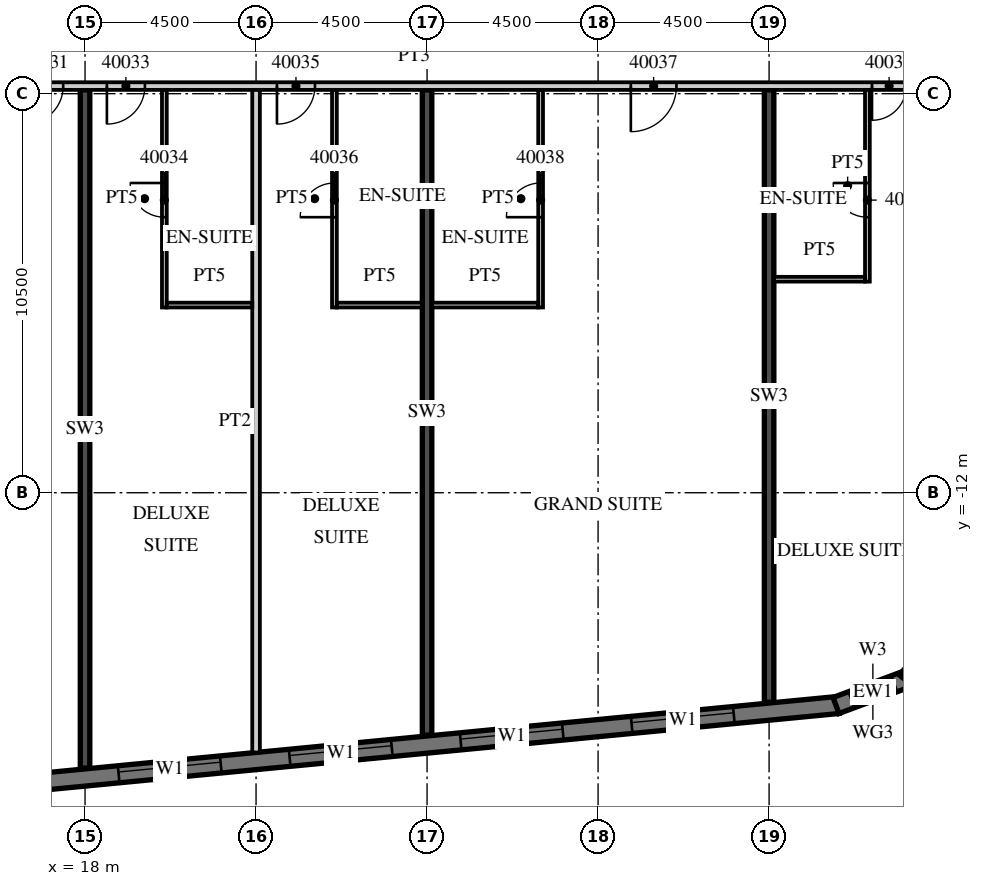
"""IFC4 building model, lengths in metres.
Left out: names, types, materials, properties, quantities, classifications, styles, units other than length and angle.
Written with IfcOpenShell. Run it as: python <this file> out.ifc"""

import sys

from ifc_helpers import new_model, si_unit, direction, frame, frame_2d, origin, place, context, subcontext, project, spatial, polyline, rectangle, outline, extrude, element, fill, save


model = new_model("IFC4")
c1 = context("Model", 3, precision=1e-05, world=origin(), true_north=direction((0.0, 1.0)))
c2 = subcontext(c1, "Body", "Model", "MODEL_VIEW")
j1 = project(units=[si_unit("LENGTHUNIT", "METRE"), si_unit("PLANEANGLEUNIT", "RADIAN")], contexts=[c1])
p1 = place(None, origin())
s1 = spatial("IfcSite", under=j1, at=p1, CompositionType="ELEMENT")
p2 = place(p1, origin())
s2 = spatial("IfcBuilding", under=s1, at=p2, CompositionType="ELEMENT")
p3 = place(p2, frame((0.0, 0.0, 173.5)))
s3 = spatial("IfcBuildingStorey", under=s2, at=p3, CompositionType="ELEMENT", Elevation=173.5)
p4 = place(p3, frame((18.0, -19.245, 0.0), z_axis=(0.0, 0.0, 1.0), x_axis=(0.0, 1.0, 0.0)))
e1 = element("IfcWall", 1, at=p4, inside=s3, PredefinedType="SHEAR", context=c2, shape_type="SweptSolid", body=[
    extrude(rectangle(XDim=17.845, YDim=0.25, at=frame_2d((8.923, 0.0))), origin(), (0.0, 0.0, 1.0), 3.3),
])
p5 = place(p3, frame((27.0, -18.379, 0.0), z_axis=(0.0, 0.0, 1.0), x_axis=(0.0, 1.0, 0.0)))
e2 = element("IfcWall", 2, at=p5, inside=s3, PredefinedType="SHEAR", context=c2, shape_type="SweptSolid", body=[
    extrude(rectangle(XDim=16.979, YDim=0.25, at=frame_2d((8.489, 0.0))), origin(), (0.0, 0.0, 1.0), 3.3),
])
p6 = place(p3, frame((36.0, -17.512, 0.0), z_axis=(0.0, 0.0, 1.0), x_axis=(0.0, 1.0, 0.0)))
e3 = element("IfcWall", 3, at=p6, inside=s3, PredefinedType="SHEAR", context=c2, shape_type="SweptSolid", body=[
    extrude(rectangle(XDim=16.112, YDim=0.25, at=frame_2d((8.056, 0.0))), origin(), (0.0, 0.0, 1.0), 3.3),
])
p7 = place(p3, frame((-13.521, -22.529, 0.0), z_axis=(0.0, 0.0, 1.0), x_axis=(0.995396436651, 0.095843277819, 0.0)))
e4 = element("IfcWall", 4, at=p7, inside=s3, PredefinedType="SOLIDWALL", context=c2, shape_type="SweptSolid", body=[
    extrude(rectangle(XDim=51.578, YDim=0.45, at=frame_2d((25.789, 0.0))), origin(), (0.0, 0.0, 1.0), 3.02),
])
p8 = place(p7, frame((0.91, 0.0, 0.45)))
e5 = element("IfcOpeningElement", 5, at=p8, cuts=e4, PredefinedType="OPENING", context=c2, shape_type="SweptSolid", body=[
    extrude(rectangle(XDim=2.7, YDim=2.25, at=frame_2d((1.35, 1.125))), frame((0.0, 0.235, 0.0), z_axis=(0.0, -1.0, 0.0), x_axis=(1.0, 0.0, 0.0)), (0.0, 0.0, 1.0), 0.47),
])
p9 = place(p7, frame((5.431, 0.0, 0.45)))
e6 = element("IfcOpeningElement", 6, at=p9, cuts=e4, PredefinedType="OPENING", context=c2, shape_type="SweptSolid", body=[
    extrude(rectangle(XDim=2.7, YDim=2.25, at=frame_2d((1.35, 1.125))), frame((0.0, 0.235, 0.0), z_axis=(0.0, -1.0, 0.0), x_axis=(1.0, 0.0, 0.0)), (0.0, 0.0, 1.0), 0.47),
])
p10 = place(p7, frame((9.952, 0.0, 0.45)))
e7 = element("IfcOpeningElement", 7, at=p10, cuts=e4, PredefinedType="OPENING", context=c2, shape_type="SweptSolid", body=[
    extrude(rectangle(XDim=2.7, YDim=2.25, at=frame_2d((1.35, 1.125))), frame((0.0, 0.235, 0.0), z_axis=(0.0, -1.0, 0.0), x_axis=(1.0, 0.0, 0.0)), (0.0, 0.0, 1.0), 0.47),
])
p11 = place(p7, frame((14.473, 0.0, 0.45)))
e8 = element("IfcOpeningElement", 8, at=p11, cuts=e4, PredefinedType="OPENING", context=c2, shape_type="SweptSolid", body=[
    extrude(rectangle(XDim=2.7, YDim=2.25, at=frame_2d((1.35, 1.125))), frame((0.0, 0.235, 0.0), z_axis=(0.0, -1.0, 0.0), x_axis=(1.0, 0.0, 0.0)), (0.0, 0.0, 1.0), 0.47),
])
p12 = place(p7, frame((18.994, 0.0, 0.45)))
e9 = element("IfcOpeningElement", 9, at=p12, cuts=e4, PredefinedType="OPENING", context=c2, shape_type="SweptSolid", body=[
    extrude(rectangle(XDim=2.7, YDim=2.25, at=frame_2d((1.35, 1.125))), frame((0.0, 0.235, 0.0), z_axis=(0.0, -1.0, 0.0), x_axis=(1.0, 0.0, 0.0)), (0.0, 0.0, 1.0), 0.47),
])
p13 = place(p7, frame((23.514, 0.0, 0.45)))
e10 = element("IfcOpeningElement", 10, at=p13, cuts=e4, PredefinedType="OPENING", context=c2, shape_type="SweptSolid", body=[
    extrude(rectangle(XDim=2.7, YDim=2.25, at=frame_2d((1.35, 1.125))), frame((0.0, 0.235, 0.0), z_axis=(0.0, -1.0, 0.0), x_axis=(1.0, 0.0, 0.0)), (0.0, 0.0, 1.0), 0.47),
])
p14 = place(p7, frame((28.035, 0.0, 0.45)))
e11 = element("IfcOpeningElement", 11, at=p14, cuts=e4, PredefinedType="OPENING", context=c2, shape_type="SweptSolid", body=[
    extrude(rectangle(XDim=2.7, YDim=2.25, at=frame_2d((1.35, 1.125))), frame((0.0, 0.235, 0.0), z_axis=(0.0, -1.0, 0.0), x_axis=(1.0, 0.0, 0.0)), (0.0, 0.0, 1.0), 0.47),
])
p15 = place(p7, frame((32.556, 0.0, 0.45)))
e12 = element("IfcOpeningElement", 12, at=p15, cuts=e4, PredefinedType="OPENING", context=c2, shape_type="SweptSolid", body=[
    extrude(rectangle(XDim=2.7, YDim=2.25, at=frame_2d((1.35, 1.125))), frame((0.0, 0.235, 0.0), z_axis=(0.0, -1.0, 0.0), x_axis=(1.0, 0.0, 0.0)), (0.0, 0.0, 1.0), 0.47),
])
p16 = place(p7, frame((37.077, 0.0, 0.45)))
e13 = element("IfcOpeningElement", 13, at=p16, cuts=e4, PredefinedType="OPENING", context=c2, shape_type="SweptSolid", body=[
    extrude(rectangle(XDim=2.7, YDim=2.25, at=frame_2d((1.35, 1.125))), frame((0.0, 0.235, 0.0), z_axis=(0.0, -1.0, 0.0), x_axis=(1.0, 0.0, 0.0)), (0.0, 0.0, 1.0), 0.47),
])
p17 = place(p7, frame((41.598, 0.0, 0.45)))
e14 = element("IfcOpeningElement", 14, at=p17, cuts=e4, PredefinedType="OPENING", context=c2, shape_type="SweptSolid", body=[
    extrude(rectangle(XDim=2.7, YDim=2.25, at=frame_2d((1.35, 1.125))), frame((0.0, 0.235, 0.0), z_axis=(0.0, -1.0, 0.0), x_axis=(1.0, 0.0, 0.0)), (0.0, 0.0, 1.0), 0.47),
])
p18 = place(p7, frame((46.119, 0.0, 0.45)))
e15 = element("IfcOpeningElement", 15, at=p18, cuts=e4, PredefinedType="OPENING", context=c2, shape_type="SweptSolid", body=[
    extrude(rectangle(XDim=2.7, YDim=2.25, at=frame_2d((1.35, 1.125))), frame((0.0, 0.235, 0.0), z_axis=(0.0, -1.0, 0.0), x_axis=(1.0, 0.0, 0.0)), (0.0, 0.0, 1.0), 0.47),
])
p19 = place(p3, frame((37.761, -17.598, 0.0), z_axis=(0.0, 0.0, 1.0), x_axis=(0.936677599948, 0.350192909346, 0.0)))
e16 = element("IfcWall", 16, at=p19, inside=s3, PredefinedType="SOLIDWALL", context=c2, shape_type="SweptSolid", body=[
    extrude(outline(polyline([(0.0, -0.225), (2.071, -0.225), (1.95, 0.225), (0.121, 0.225), (0.0, -0.225)])), origin(), (0.0, 0.0, 1.0), 3.02),
])
p20 = place(p19, frame((0.435, 0.0, 0.45)))
e17 = element("IfcOpeningElement", 17, at=p20, cuts=e16, PredefinedType="OPENING", context=c2, shape_type="SweptSolid", body=[
    extrude(rectangle(XDim=1.2, YDim=2.25, at=frame_2d((0.6, 1.125))), frame((0.0, 0.235, 0.0), z_axis=(0.0, -1.0, 0.0), x_axis=(1.0, 0.0, 0.0)), (0.0, 0.0, 1.0), 0.47),
])
p21 = place(p3, frame((39.606, -16.941, 0.0), z_axis=(0.0, 0.0, 1.0), x_axis=(0.636116318187, 0.771593176315, 0.0)))
e18 = element("IfcWall", 18, at=p21, inside=s3, PredefinedType="SOLIDWALL", context=c2, shape_type="SweptSolid", body=[
    extrude(outline(polyline([(0.0, -0.225), (2.071, -0.225), (1.95, 0.225), (0.121, 0.225), (0.0, -0.225)])), origin(), (0.0, 0.0, 1.0), 3.02),
])
p22 = place(p21, frame((0.435, 0.0, 0.45)))
e19 = element("IfcOpeningElement", 19, at=p22, cuts=e18, PredefinedType="OPENING", context=c2, shape_type="SweptSolid", body=[
    extrude(rectangle(XDim=1.2, YDim=2.25, at=frame_2d((0.6, 1.125))), frame((0.0, 0.235, 0.0), z_axis=(0.0, -1.0, 0.0), x_axis=(1.0, 0.0, 0.0)), (0.0, 0.0, 1.0), 0.47),
])
p23 = place(p3, frame((41.214, -13.466, 0.0), z_axis=(0.0, 0.0, 1.0), x_axis=(-0.095847314626, 0.995396047952, 0.0)))
e20 = element("IfcWall", 20, at=p23, inside=s3, PredefinedType="SOLIDWALL", context=c2, shape_type="SweptSolid", body=[
    extrude(rectangle(XDim=34.0, YDim=0.45, at=frame_2d((17.0, 0.0))), origin(), (0.0, 0.0, 1.0), 3.02),
])
p24 = place(p23, frame((3.869, 0.0, 0.45)))
e21 = element("IfcOpeningElement", 21, at=p24, cuts=e20, PredefinedType="OPENING", context=c2, shape_type="SweptSolid", body=[
    extrude(rectangle(XDim=3.3, YDim=2.25, at=frame_2d((1.65, 1.125))), frame((0.0, 0.235, 0.0), z_axis=(0.0, -1.0, 0.0), x_axis=(1.0, 0.0, 0.0)), (0.0, 0.0, 1.0), 0.47),
])
p25 = place(p23, frame((8.39, 0.0, 0.45)))
e22 = element("IfcOpeningElement", 22, at=p25, cuts=e20, PredefinedType="OPENING", context=c2, shape_type="SweptSolid", body=[
    extrude(rectangle(XDim=3.3, YDim=2.25, at=frame_2d((1.65, 1.125))), frame((0.0, 0.235, 0.0), z_axis=(0.0, -1.0, 0.0), x_axis=(1.0, 0.0, 0.0)), (0.0, 0.0, 1.0), 0.47),
])
p26 = place(p3, frame((13.5, -1.3, 0.0), z_axis=(0.0, 0.0, 1.0), x_axis=(1.0, 0.0, 0.0)))
e23 = element("IfcWall", 23, at=p26, inside=s3, PredefinedType="PARTITIONING", context=c2, shape_type="SweptSolid", body=[
    extrude(rectangle(XDim=26.317, YDim=0.2, at=frame_2d((13.158, 0.0))), origin(), (0.0, 0.0, 1.0), 3.02),
])
p27 = place(p26, frame((2.925, 0.0, 0.0)))
e24 = element("IfcOpeningElement", 24, at=p27, cuts=e23, PredefinedType="OPENING", context=c2, shape_type="SweptSolid", body=[
    extrude(rectangle(XDim=1.0, YDim=2.1, at=frame_2d((0.5, 1.05))), frame((0.0, 0.11, 0.0), z_axis=(0.0, -1.0, 0.0), x_axis=(1.0, 0.0, 0.0)), (0.0, 0.0, 1.0), 0.22),
])
p28 = place(p26, frame((5.075, 0.0, 0.0)))
e25 = element("IfcOpeningElement", 25, at=p28, cuts=e23, PredefinedType="OPENING", context=c2, shape_type="SweptSolid", body=[
    extrude(rectangle(XDim=1.0, YDim=2.1, at=frame_2d((0.5, 1.05))), frame((0.0, 0.11, 0.0), z_axis=(0.0, -1.0, 0.0), x_axis=(1.0, 0.0, 0.0)), (0.0, 0.0, 1.0), 0.22),
])
p29 = place(p26, frame((9.55, 0.0, 0.0)))
e26 = element("IfcOpeningElement", 26, at=p29, cuts=e23, PredefinedType="OPENING", context=c2, shape_type="SweptSolid", body=[
    extrude(rectangle(XDim=1.0, YDim=2.1, at=frame_2d((0.5, 1.05))), frame((0.0, 0.11, 0.0), z_axis=(0.0, -1.0, 0.0), x_axis=(1.0, 0.0, 0.0)), (0.0, 0.0, 1.0), 0.22),
])
p30 = place(p26, frame((18.862, 0.0, 0.0)))
e27 = element("IfcOpeningElement", 27, at=p30, cuts=e23, PredefinedType="OPENING", context=c2, shape_type="SweptSolid", body=[
    extrude(rectangle(XDim=1.2, YDim=2.1, at=frame_2d((0.6, 1.05))), frame((0.0, 0.11, 0.0), z_axis=(0.0, -1.0, 0.0), x_axis=(1.0, 0.0, 0.0)), (0.0, 0.0, 1.0), 0.22),
])
p31 = place(p26, frame((25.208, 0.0, 0.0)))
e28 = element("IfcOpeningElement", 28, at=p31, cuts=e23, PredefinedType="OPENING", context=c2, shape_type="SweptSolid", body=[
    extrude(rectangle(XDim=0.9, YDim=2.1, at=frame_2d((0.45, 1.05))), frame((0.0, 0.11, 0.0), z_axis=(0.0, -1.0, 0.0), x_axis=(1.0, 0.0, 0.0)), (0.0, 0.0, 1.0), 0.22),
])
p32 = place(p3, frame((22.5, -18.834, 0.0), z_axis=(0.0, 0.0, 1.0), x_axis=(0.0, 1.0, 0.0)))
e29 = element("IfcWall", 29, at=p32, inside=s3, PredefinedType="PARTITIONING", context=c2, shape_type="SweptSolid", body=[
    extrude(rectangle(XDim=17.434, YDim=0.2, at=frame_2d((8.717, 0.0))), origin(), (0.0, 0.0, 1.0), 3.02),
])
p33 = place(p3, frame((20.087, -7.125, 0.0), z_axis=(0.0, 0.0, 1.0), x_axis=(0.0, 1.0, 0.0)))
e30 = element("IfcWall", 30, at=p33, inside=s3, PredefinedType="PARTITIONING", context=c2, shape_type="SweptSolid", body=[
    extrude(rectangle(XDim=5.725, YDim=0.125, at=frame_2d((2.863, 0.0))), origin(), (0.0, 0.0, 1.0), 3.02),
])
p34 = place(p33, frame((2.375, 0.0, 0.0)))
e31 = element("IfcOpeningElement", 31, at=p34, cuts=e30, PredefinedType="OPENING", context=c2, shape_type="SweptSolid", body=[
    extrude(rectangle(XDim=0.9, YDim=2.1, at=frame_2d((0.45, 1.05))), frame((0.0, 0.073, 0.0), z_axis=(0.0, -1.0, 0.0), x_axis=(1.0, 0.0, 0.0)), (0.0, 0.0, 1.0), 0.145),
])
p35 = place(p3, frame((20.15, -7.062, 0.0), z_axis=(0.0, 0.0, 1.0), x_axis=(1.0, 0.0, 0.0)))
e32 = element("IfcWall", 32, at=p35, inside=s3, PredefinedType="PARTITIONING", context=c2, shape_type="SweptSolid", body=[
    extrude(rectangle(XDim=2.25, YDim=0.125, at=frame_2d((1.125, 0.0))), origin(), (0.0, 0.0, 1.0), 3.02),
])
p36 = place(p3, frame((24.562, -7.125, 0.0), z_axis=(0.0, 0.0, 1.0), x_axis=(0.0, 1.0, 0.0)))
e33 = element("IfcWall", 33, at=p36, inside=s3, PredefinedType="PARTITIONING", context=c2, shape_type="SweptSolid", body=[
    extrude(rectangle(XDim=5.725, YDim=0.125, at=frame_2d((2.863, 0.0))), origin(), (0.0, 0.0, 1.0), 3.02),
])
p37 = place(p36, frame((2.375, 0.0, 0.0)))
e34 = element("IfcOpeningElement", 34, at=p37, cuts=e33, PredefinedType="OPENING", context=c2, shape_type="SweptSolid", body=[
    extrude(rectangle(XDim=0.9, YDim=2.1, at=frame_2d((0.45, 1.05))), frame((0.0, 0.073, 0.0), z_axis=(0.0, -1.0, 0.0), x_axis=(1.0, 0.0, 0.0)), (0.0, 0.0, 1.0), 0.145),
])
p38 = place(p3, frame((24.625, -7.062, 0.0), z_axis=(0.0, 0.0, 1.0), x_axis=(1.0, 0.0, 0.0)))
e35 = element("IfcWall", 35, at=p38, inside=s3, PredefinedType="PARTITIONING", context=c2, shape_type="SweptSolid", body=[
    extrude(rectangle(XDim=2.25, YDim=0.125, at=frame_2d((1.125, 0.0))), origin(), (0.0, 0.0, 1.0), 3.02),
])
p39 = place(p3, frame((29.988, -7.125, 0.0), z_axis=(0.0, 0.0, 1.0), x_axis=(0.0, 1.0, 0.0)))
e36 = element("IfcWall", 36, at=p39, inside=s3, PredefinedType="PARTITIONING", context=c2, shape_type="SweptSolid", body=[
    extrude(rectangle(XDim=5.725, YDim=0.125, at=frame_2d((2.863, 0.0))), origin(), (0.0, 0.0, 1.0), 3.02),
])
p40 = place(p39, frame((2.375, 0.0, 0.0)))
e37 = element("IfcOpeningElement", 37, at=p40, cuts=e36, PredefinedType="OPENING", context=c2, shape_type="SweptSolid", body=[
    extrude(rectangle(XDim=0.9, YDim=2.1, at=frame_2d((0.45, 1.05))), frame((0.0, 0.073, 0.0), z_axis=(0.0, -1.0, 0.0), x_axis=(1.0, 0.0, 0.0)), (0.0, 0.0, 1.0), 0.145),
])
p41 = place(p3, frame((27.125, -7.062, 0.0), z_axis=(0.0, 0.0, 1.0), x_axis=(1.0, 0.0, 0.0)))
e38 = element("IfcWall", 38, at=p41, inside=s3, PredefinedType="PARTITIONING", context=c2, shape_type="SweptSolid", body=[
    extrude(rectangle(XDim=2.8, YDim=0.125, at=frame_2d((1.4, 0.0))), origin(), (0.0, 0.0, 1.0), 3.02),
])
p42 = place(p3, frame((38.587, -6.445, 0.0), z_axis=(0.0, 0.0, 1.0), x_axis=(0.0, 1.0, 0.0)))
e39 = element("IfcWall", 39, at=p42, inside=s3, PredefinedType="PARTITIONING", context=c2, shape_type="SweptSolid", body=[
    extrude(rectangle(XDim=5.045, YDim=0.125, at=frame_2d((2.522, 0.0))), origin(), (0.0, 0.0, 1.0), 3.02),
])
p43 = place(p42, frame((1.695, 0.0, 0.0)))
e40 = element("IfcOpeningElement", 40, at=p43, cuts=e39, PredefinedType="OPENING", context=c2, shape_type="SweptSolid", body=[
    extrude(rectangle(XDim=0.9, YDim=2.1, at=frame_2d((0.45, 1.05))), frame((0.0, 0.073, 0.0), z_axis=(0.0, -1.0, 0.0), x_axis=(1.0, 0.0, 0.0)), (0.0, 0.0, 1.0), 0.145),
])
p44 = place(p3, frame((36.125, -6.382, 0.0), z_axis=(0.0, 0.0, 1.0), x_axis=(1.0, 0.0, 0.0)))
e41 = element("IfcWall", 41, at=p44, inside=s3, PredefinedType="PARTITIONING", context=c2, shape_type="SweptSolid", body=[
    extrude(rectangle(XDim=2.4, YDim=0.125, at=frame_2d((1.2, 0.0))), origin(), (0.0, 0.0, 1.0), 3.02),
])
p45 = place(p15, origin())
e42 = element("IfcWindow", 42, at=p45, inside=s3, PartitioningType="SINGLE_PANEL", PredefinedType="WINDOW", context=c2, shape_type="SweptSolid", body=[
    extrude(rectangle(XDim=2.7, YDim=2.25, at=frame_2d((1.35, 1.125))), frame((0.0, 0.09, 0.0), z_axis=(0.0, -1.0, 0.0), x_axis=(1.0, 0.0, 0.0)), (0.0, 0.0, 1.0), 0.06),
])
fill(e12, e42)
p46 = place(p16, origin())
e43 = element("IfcWindow", 43, at=p46, inside=s3, PartitioningType="SINGLE_PANEL", PredefinedType="WINDOW", context=c2, shape_type="SweptSolid", body=[
    extrude(rectangle(XDim=2.7, YDim=2.25, at=frame_2d((1.35, 1.125))), frame((0.0, 0.09, 0.0), z_axis=(0.0, -1.0, 0.0), x_axis=(1.0, 0.0, 0.0)), (0.0, 0.0, 1.0), 0.06),
])
fill(e13, e43)
p47 = place(p17, origin())
e44 = element("IfcWindow", 44, at=p47, inside=s3, PartitioningType="SINGLE_PANEL", PredefinedType="WINDOW", context=c2, shape_type="SweptSolid", body=[
    extrude(rectangle(XDim=2.7, YDim=2.25, at=frame_2d((1.35, 1.125))), frame((0.0, 0.09, 0.0), z_axis=(0.0, -1.0, 0.0), x_axis=(1.0, 0.0, 0.0)), (0.0, 0.0, 1.0), 0.06),
])
fill(e14, e44)
p48 = place(p18, origin())
e45 = element("IfcWindow", 45, at=p48, inside=s3, PartitioningType="SINGLE_PANEL", PredefinedType="WINDOW", context=c2, shape_type="SweptSolid", body=[
    extrude(rectangle(XDim=2.7, YDim=2.25, at=frame_2d((1.35, 1.125))), frame((0.0, 0.09, 0.0), z_axis=(0.0, -1.0, 0.0), x_axis=(1.0, 0.0, 0.0)), (0.0, 0.0, 1.0), 0.06),
])
fill(e15, e45)
p49 = place(p20, origin())
e46 = element("IfcWindow", 46, at=p49, inside=s3, PartitioningType="SINGLE_PANEL", PredefinedType="WINDOW", context=c2, shape_type="SweptSolid", body=[
    extrude(rectangle(XDim=1.2, YDim=2.25, at=frame_2d((0.6, 1.125))), frame((0.0, 0.09, 0.0), z_axis=(0.0, -1.0, 0.0), x_axis=(1.0, 0.0, 0.0)), (0.0, 0.0, 1.0), 0.06),
])
fill(e17, e46)
p50 = place(p27, origin())
e47 = element("IfcDoor", 47, at=p50, inside=s3, OperationType="SINGLE_SWING_LEFT", PredefinedType="DOOR", context=c2, shape_type="SweptSolid", body=[
    extrude(rectangle(XDim=1.0, YDim=2.1, at=frame_2d((0.5, 1.05))), frame((0.0, 0.025, 0.0), z_axis=(0.0, -1.0, 0.0), x_axis=(1.0, 0.0, 0.0)), (0.0, 0.0, 1.0), 0.05),
])
fill(e24, e47)
p51 = place(p28, origin())
e48 = element("IfcDoor", 48, at=p51, inside=s3, OperationType="SINGLE_SWING_LEFT", PredefinedType="DOOR", context=c2, shape_type="SweptSolid", body=[
    extrude(rectangle(XDim=1.0, YDim=2.1, at=frame_2d((0.5, 1.05))), frame((0.0, 0.025, 0.0), z_axis=(0.0, -1.0, 0.0), x_axis=(1.0, 0.0, 0.0)), (0.0, 0.0, 1.0), 0.05),
])
fill(e25, e48)
p52 = place(p34, origin())
e49 = element("IfcDoor", 49, at=p52, inside=s3, OperationType="SINGLE_SWING_RIGHT", PredefinedType="DOOR", context=c2, shape_type="SweptSolid", body=[
    extrude(rectangle(XDim=0.9, YDim=2.1, at=frame_2d((0.45, 1.05))), frame((0.0, 0.025, 0.0), z_axis=(0.0, -1.0, 0.0), x_axis=(1.0, 0.0, 0.0)), (0.0, 0.0, 1.0), 0.05),
])
fill(e31, e49)
p53 = place(p29, origin())
e50 = element("IfcDoor", 50, at=p53, inside=s3, OperationType="SINGLE_SWING_LEFT", PredefinedType="DOOR", context=c2, shape_type="SweptSolid", body=[
    extrude(rectangle(XDim=1.0, YDim=2.1, at=frame_2d((0.5, 1.05))), frame((0.0, 0.025, 0.0), z_axis=(0.0, -1.0, 0.0), x_axis=(1.0, 0.0, 0.0)), (0.0, 0.0, 1.0), 0.05),
])
fill(e26, e50)
p54 = place(p37, origin())
e51 = element("IfcDoor", 51, at=p54, inside=s3, OperationType="SINGLE_SWING_LEFT", PredefinedType="DOOR", context=c2, shape_type="SweptSolid", body=[
    extrude(rectangle(XDim=0.9, YDim=2.1, at=frame_2d((0.45, 1.05))), frame((0.0, 0.025, 0.0), z_axis=(0.0, -1.0, 0.0), x_axis=(1.0, 0.0, 0.0)), (0.0, 0.0, 1.0), 0.05),
])
fill(e34, e51)
p55 = place(p30, origin())
e52 = element("IfcDoor", 52, at=p55, inside=s3, OperationType="SINGLE_SWING_LEFT", PredefinedType="DOOR", context=c2, shape_type="SweptSolid", body=[
    extrude(rectangle(XDim=1.2, YDim=2.1, at=frame_2d((0.6, 1.05))), frame((0.0, 0.025, 0.0), z_axis=(0.0, -1.0, 0.0), x_axis=(1.0, 0.0, 0.0)), (0.0, 0.0, 1.0), 0.05),
])
fill(e27, e52)
p56 = place(p40, origin())
e53 = element("IfcDoor", 53, at=p56, inside=s3, OperationType="SINGLE_SWING_LEFT", PredefinedType="DOOR", context=c2, shape_type="SweptSolid", body=[
    extrude(rectangle(XDim=0.9, YDim=2.1, at=frame_2d((0.45, 1.05))), frame((0.0, 0.025, 0.0), z_axis=(0.0, -1.0, 0.0), x_axis=(1.0, 0.0, 0.0)), (0.0, 0.0, 1.0), 0.05),
])
fill(e37, e53)
p57 = place(p31, origin())
e54 = element("IfcDoor", 54, at=p57, inside=s3, OperationType="SINGLE_SWING_LEFT", PredefinedType="DOOR", context=c2, shape_type="SweptSolid", body=[
    extrude(rectangle(XDim=0.9, YDim=2.1, at=frame_2d((0.45, 1.05))), frame((0.0, 0.025, 0.0), z_axis=(0.0, -1.0, 0.0), x_axis=(1.0, 0.0, 0.0)), (0.0, 0.0, 1.0), 0.05),
])
fill(e28, e54)
p58 = place(p43, origin())
e55 = element("IfcDoor", 55, at=p58, inside=s3, OperationType="SINGLE_SWING_RIGHT", PredefinedType="DOOR", context=c2, shape_type="SweptSolid", body=[
    extrude(rectangle(XDim=0.9, YDim=2.1, at=frame_2d((0.45, 1.05))), frame((0.0, 0.025, 0.0), z_axis=(0.0, -1.0, 0.0), x_axis=(1.0, 0.0, 0.0)), (0.0, 0.0, 1.0), 0.05),
])
fill(e40, e55)
save(model, sys.argv[1])
